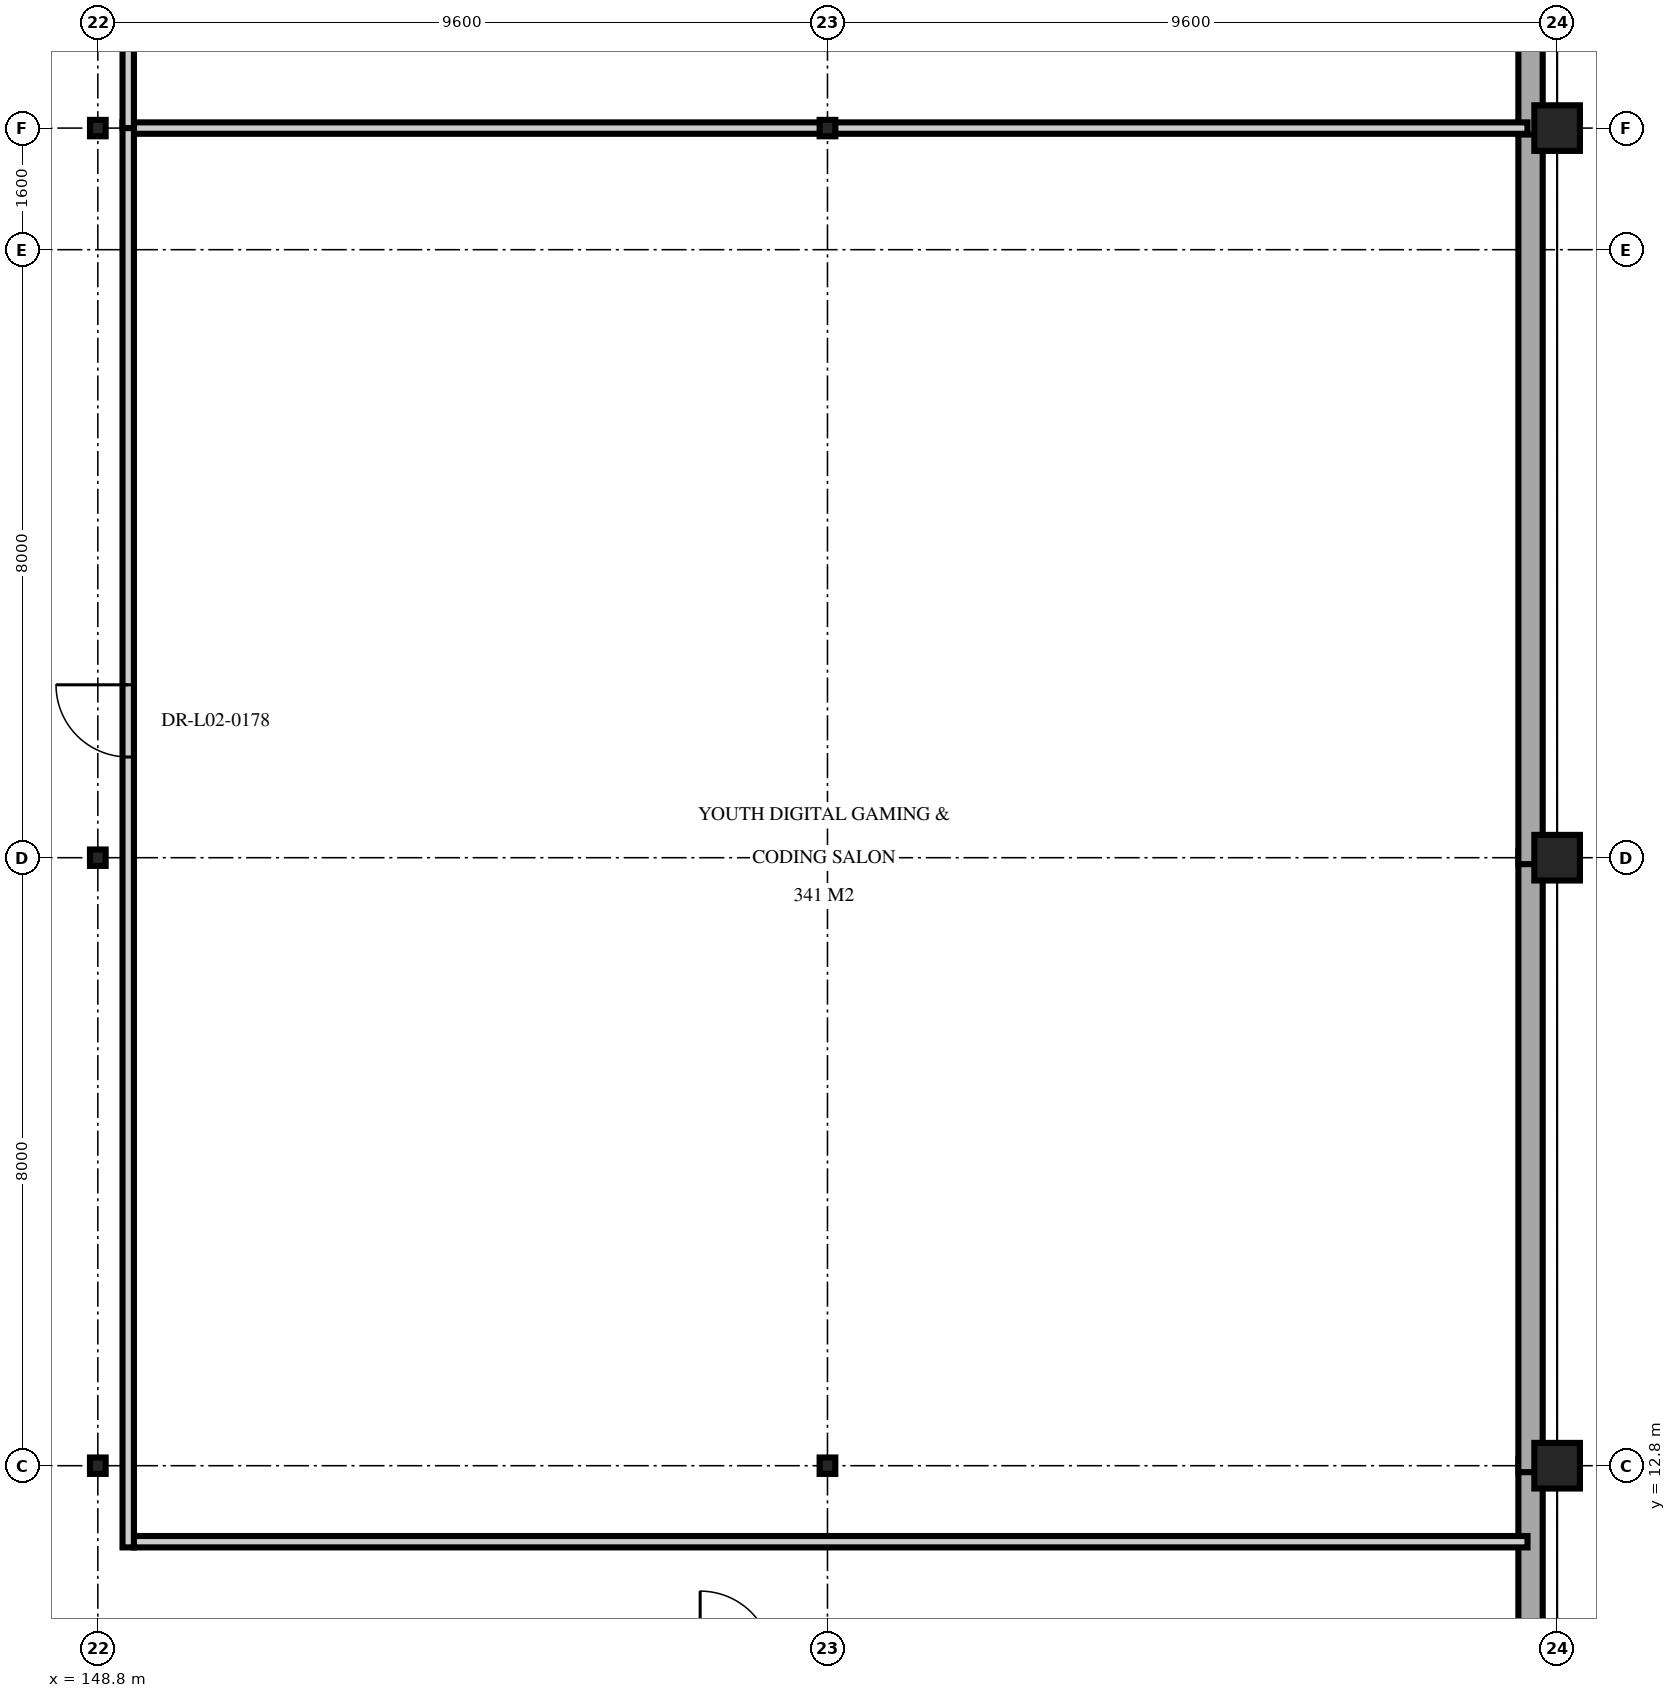
"""IFC4 building model, lengths in metres.
Left out: names, types, materials, properties, quantities, classifications, styles, units other than length and angle.
Written with IfcOpenShell. Run it as: python <this file> out.ifc"""

import sys

from ifc_helpers import new_model, si_unit, direction, frame, frame_2d, origin, origin_2d, place, context, subcontext, project, spatial, rectangle, i_section, extrude, element, fill, save


model = new_model("IFC4")
c1 = context("Model", 3, precision=1e-05, world=origin(), true_north=direction((0.0, 1.0)))
c2 = subcontext(c1, "Body", "Model", "MODEL_VIEW")
j1 = project(units=[si_unit("LENGTHUNIT", "METRE"), si_unit("PLANEANGLEUNIT", "RADIAN")], contexts=[c1])
p1 = place(None, origin())
s1 = spatial("IfcSite", under=j1, at=p1, CompositionType="ELEMENT")
p2 = place(p1, origin())
s2 = spatial("IfcBuilding", under=s1, at=p2, CompositionType="ELEMENT")
p3 = place(p2, frame((0.0, 0.0, 9.6)))
s3 = spatial("IfcBuildingStorey", under=s2, at=p3, CompositionType="ELEMENT", Elevation=9.6)
for number, where, z_axis, x_axis in (
    (1, (148.8, 12.8, 0.0), (0.0, 0.0, 1.0), (1.0, 0.0, 0.0)),
    (2, (148.8, 20.8, 0.0), (0.0, 0.0, 1.0), (1.0, 0.0, 0.0)),
    (3, (148.8, 30.4, 0.0), (0.0, 0.0, 1.0), (1.0, 0.0, 0.0)),
    (4, (158.4, 12.8, 0.0), (0.0, 0.0, 1.0), (1.0, 0.0, 0.0)),
    (5, (158.4, 20.8, 0.0), (0.0, 0.0, 1.0), (1.0, 0.0, 0.0)),
    (6, (158.4, 30.4, 0.0), (0.0, 0.0, 1.0), (1.0, 0.0, 0.0)),
):
    element("IfcColumn", number, at=place(p3, frame(where, z_axis=z_axis, x_axis=x_axis)), inside=s3, PredefinedType="COLUMN", context=c2, shape_type="SweptSolid", body=[
        extrude(i_section(OverallWidth=0.206, OverallDepth=0.216, WebThickness=0.01, FlangeThickness=0.017, at=origin_2d()), origin(), (0.0, 0.0, 1.0), 4.5),
    ])
for number, where, z_axis, x_axis in (
    (7, (168.0, 12.8, 0.0), (0.0, 0.0, 1.0), (1.0, 0.0, 0.0)),
    (8, (168.0, 20.8, 0.0), (0.0, 0.0, 1.0), (1.0, 0.0, 0.0)),
    (9, (168.0, 30.4, 0.0), (0.0, 0.0, 1.0), (1.0, 0.0, 0.0)),
):
    element("IfcColumn", number, at=place(p3, frame(where, z_axis=z_axis, x_axis=x_axis)), inside=s3, PredefinedType="COLUMN", context=c2, shape_type="SweptSolid", body=[
        extrude(rectangle(XDim=0.6, YDim=0.6, at=origin_2d()), origin(), (0.0, 0.0, 1.0), 3.793),
    ])
for number, where, z_axis, x_axis in (
    (10, (167.65, 12.885, 0.0), (0.0, 0.0, 1.0), (0.0, -1.0, 0.0)),
    (11, (167.65, 20.885, 0.0), (0.0, 0.0, 1.0), (0.0, -1.0, 0.0)),
):
    element("IfcWall", number, at=place(p3, frame(where, z_axis=z_axis, x_axis=x_axis)), inside=s3, PredefinedType="SOLIDWALL", context=c2, shape_type="SweptSolid", body=[
        extrude(rectangle(XDim=8.17, YDim=0.32, at=frame_2d((4.085, 0.0))), origin(), (0.0, 0.0, 1.0), 3.55),
    ])
p4 = place(p3, frame((167.65, 30.485, 0.0), z_axis=(0.0, 0.0, 1.0), x_axis=(0.0, -1.0, 0.0)))
e12 = element("IfcWall", 12, at=p4, inside=s3, PredefinedType="SOLIDWALL", context=c2, shape_type="SweptSolid", body=[
    extrude(rectangle(XDim=9.77, YDim=0.32, at=frame_2d((4.885, 0.0))), origin(), (0.0, 0.0, 1.0), 3.55),
])
p5 = place(p3, frame((167.65, 44.885, 0.0), z_axis=(0.0, 0.0, 1.0), x_axis=(0.0, -1.0, 0.0)))
e13 = element("IfcWall", 13, at=p5, inside=s3, PredefinedType="SOLIDWALL", context=c2, shape_type="SweptSolid", body=[
    extrude(rectangle(XDim=14.57, YDim=0.32, at=frame_2d((7.285, 0.0))), origin(), (0.0, 0.0, 1.0), 3.55),
])
p6 = place(p3, frame((149.275, 11.8, 0.0), z_axis=(0.0, 0.0, 1.0), x_axis=(1.0, 0.0, 0.0)))
e14 = element("IfcWall", 14, at=p6, inside=s3, PredefinedType="PARTITIONING", context=c2, shape_type="SweptSolid", body=[
    extrude(rectangle(XDim=18.335, YDim=0.15, at=frame_2d((9.167, 0.0))), origin(), (0.0, 0.0, 1.0), 4.274),
])
p7 = place(p3, frame((149.275, 30.4, 0.0), z_axis=(0.0, 0.0, 1.0), x_axis=(1.0, 0.0, 0.0)))
e15 = element("IfcWall", 15, at=p7, inside=s3, PredefinedType="PARTITIONING", context=c2, shape_type="SweptSolid", body=[
    extrude(rectangle(XDim=18.335, YDim=0.15, at=frame_2d((9.167, 0.0))), origin(), (0.0, 0.0, 1.0), 3.55),
])
p8 = place(p3, frame((149.2, 11.725, 0.0), z_axis=(0.0, 0.0, 1.0), x_axis=(0.0, 1.0, 0.0)))
e16 = element("IfcWall", 16, at=p8, inside=s3, PredefinedType="PARTITIONING", context=c2, shape_type="SweptSolid", body=[
    extrude(rectangle(XDim=18.75, YDim=0.15, at=frame_2d((9.375, 0.0))), origin(), (0.0, 0.0, 1.0), 5.9),
])
p9 = place(p8, frame((10.4, 0.0, 0.0)))
e17 = element("IfcOpeningElement", 17, at=p9, cuts=e16, PredefinedType="OPENING", context=c2, shape_type="SweptSolid", body=[
    extrude(rectangle(XDim=0.95, YDim=2.15, at=frame_2d((0.475, 1.075))), frame((0.0, 0.085, 0.0), z_axis=(0.0, -1.0, 0.0), x_axis=(1.0, 0.0, 0.0)), (0.0, 0.0, 1.0), 0.17),
])
p10 = place(p3, frame((149.2, 30.4, 0.0), z_axis=(0.0, 0.0, 1.0), x_axis=(0.0, 1.0, 0.0)))
e18 = element("IfcWall", 18, at=p10, inside=s3, PredefinedType="PARTITIONING", context=c2, shape_type="SweptSolid", body=[
    extrude(rectangle(XDim=14.36, YDim=0.15, at=frame_2d((7.18, 0.0))), origin(), (0.0, 0.0, 1.0), 5.9),
])
p11 = place(p10, frame((6.705, 0.0, 0.0)))
e19 = element("IfcOpeningElement", 19, at=p11, cuts=e18, PredefinedType="OPENING", context=c2, shape_type="SweptSolid", body=[
    extrude(rectangle(XDim=0.95, YDim=2.15, at=frame_2d((0.475, 1.075))), frame((0.0, 0.085, 0.0), z_axis=(0.0, -1.0, 0.0), x_axis=(1.0, 0.0, 0.0)), (0.0, 0.0, 1.0), 0.17),
])
p12 = place(p9, origin())
e20 = element("IfcDoor", 20, at=p12, inside=s3, OperationType="SINGLE_SWING_RIGHT", PredefinedType="DOOR", context=c2, shape_type="SweptSolid", body=[
    extrude(rectangle(XDim=0.95, YDim=2.15, at=frame_2d((0.475, 1.075))), frame((0.0, 0.025, 0.0), z_axis=(0.0, -1.0, 0.0), x_axis=(1.0, 0.0, 0.0)), (0.0, 0.0, 1.0), 0.05),
])
fill(e17, e20)
save(model, sys.argv[1])
